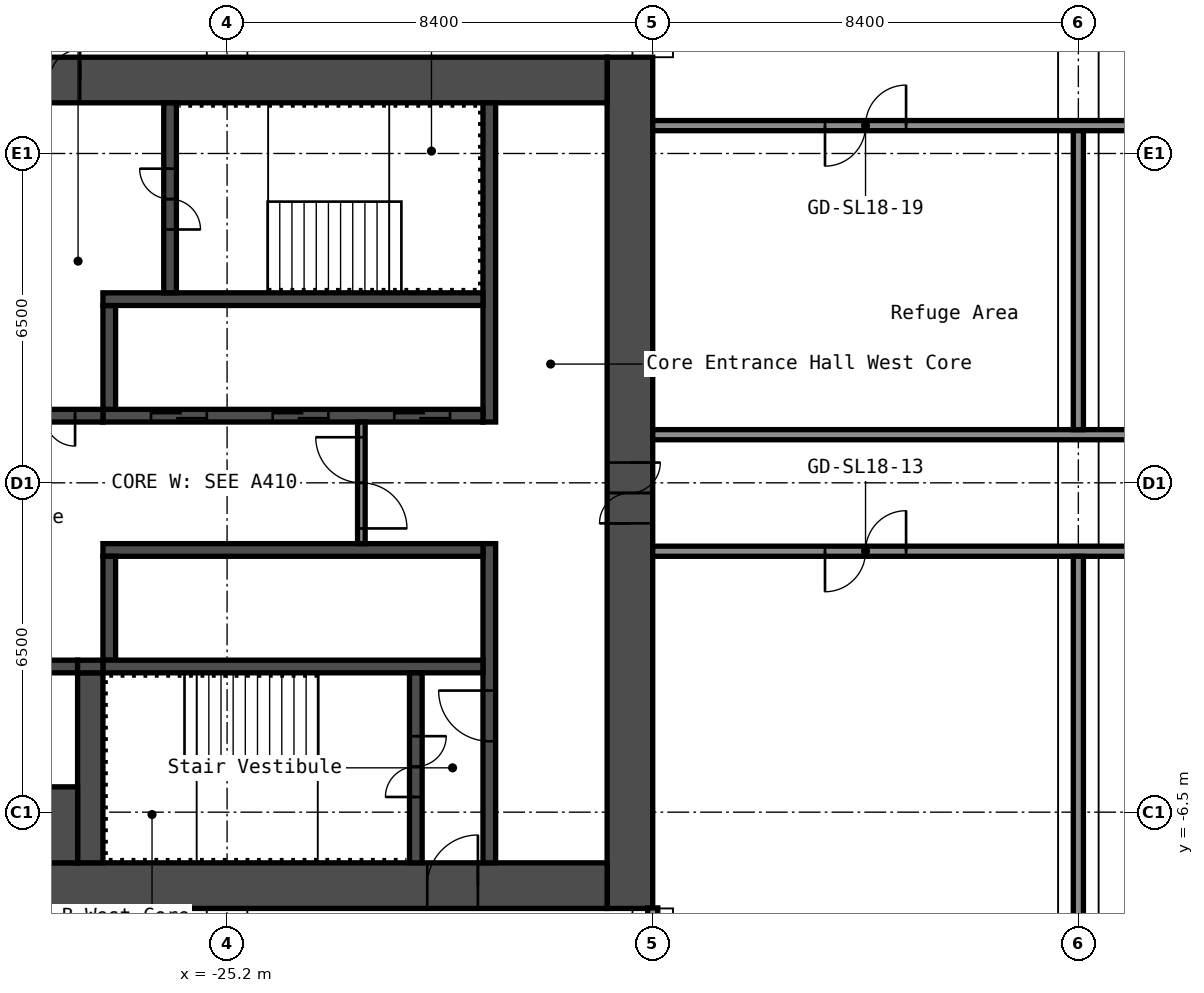
"""IFC4 building model, lengths in metres.
Left out: names, types, materials, properties, quantities, classifications, styles, units other than length and angle.
Written with IfcOpenShell. Run it as: python <this file> out.ifc"""

import sys

from ifc_helpers import new_model, si_unit, direction, frame, frame_2d, origin, place, context, subcontext, project, spatial, rectangle, extrude, element, fill, save


model = new_model("IFC4")
c1 = context("Model", 3, precision=1e-05, world=origin(), true_north=direction((0.0, 1.0)))
c2 = subcontext(c1, "Body", "Model", "MODEL_VIEW")
j1 = project(units=[si_unit("LENGTHUNIT", "METRE"), si_unit("PLANEANGLEUNIT", "RADIAN")], contexts=[c1])
p1 = place(None, origin())
s1 = spatial("IfcSite", under=j1, at=p1, CompositionType="ELEMENT")
p2 = place(p1, origin())
s2 = spatial("IfcBuilding", under=s1, at=p2, CompositionType="ELEMENT")
p3 = place(p2, frame((0.0, 0.0, 64.6)))
s3 = spatial("IfcBuildingStorey", under=s2, at=p3, CompositionType="ELEMENT", Elevation=64.6)
p4 = place(p3, frame((-17.25, -8.4, 0.0), z_axis=(0.0, 0.0, 1.0), x_axis=(0.0, 1.0, 0.0)))
e1 = element("IfcWall", 1, at=p4, inside=s3, PredefinedType="SHEAR", context=c2, shape_type="SweptSolid", body=[
    extrude(rectangle(XDim=16.8, YDim=0.9, at=frame_2d((8.4, 0.0))), origin(), (0.0, 0.0, 1.0), 4.1),
])
p5 = place(p4, frame((7.6, 0.0, 0.0)))
e2 = element("IfcOpeningElement", 2, at=p5, cuts=e1, PredefinedType="OPENING", context=c2, shape_type="SweptSolid", body=[
    extrude(rectangle(XDim=1.2, YDim=2.1, at=frame_2d((0.6, 1.05))), frame((0.0, 0.46, 0.0), z_axis=(0.0, -1.0, 0.0), x_axis=(1.0, 0.0, 0.0)), (0.0, 0.0, 1.0), 0.92),
])
p6 = place(p3, frame((-32.7, 7.95, 0.0), z_axis=(0.0, 0.0, 1.0), x_axis=(1.0, 0.0, 0.0)))
e3 = element("IfcWall", 3, at=p6, inside=s3, PredefinedType="SHEAR", context=c2, shape_type="SweptSolid", body=[
    extrude(rectangle(XDim=15.0, YDim=0.9, at=frame_2d((7.5, 0.0))), origin(), (0.0, 0.0, 1.0), 4.1),
])
p7 = place(p6, frame((3.4, 0.0, 0.0)))
e4 = element("IfcOpeningElement", 4, at=p7, cuts=e3, PredefinedType="OPENING", context=c2, shape_type="SweptSolid", body=[
    extrude(rectangle(XDim=1.2, YDim=2.1, at=frame_2d((0.6, 1.05))), frame((0.0, 0.46, 0.0), z_axis=(0.0, -1.0, 0.0), x_axis=(1.0, 0.0, 0.0)), (0.0, 0.0, 1.0), 0.92),
])
p8 = place(p6, frame((0.75, 0.0, 0.0)))
e5 = element("IfcOpeningElement", 5, at=p8, cuts=e3, PredefinedType="OPENING", context=c2, shape_type="SweptSolid", body=[
    extrude(rectangle(XDim=0.9, YDim=2.1, at=frame_2d((0.45, 1.05))), frame((0.0, 0.46, 0.0), z_axis=(0.0, -1.0, 0.0), x_axis=(1.0, 0.0, 0.0)), (0.0, 0.0, 1.0), 0.92),
])
p9 = place(p3, frame((-32.7, -7.95, 0.0), z_axis=(0.0, 0.0, 1.0), x_axis=(1.0, 0.0, 0.0)))
e6 = element("IfcWall", 6, at=p9, inside=s3, PredefinedType="SHEAR", context=c2, shape_type="SweptSolid", body=[
    extrude(rectangle(XDim=15.0, YDim=0.9, at=frame_2d((7.5, 0.0))), origin(), (0.0, 0.0, 1.0), 4.1),
])
p10 = place(p9, frame((11.45, 0.0, 0.0)))
e7 = element("IfcOpeningElement", 7, at=p10, cuts=e6, PredefinedType="OPENING", context=c2, shape_type="SweptSolid", body=[
    extrude(rectangle(XDim=1.0, YDim=2.1, at=frame_2d((0.5, 1.05))), frame((0.0, 0.46, 0.0), z_axis=(0.0, -1.0, 0.0), x_axis=(1.0, 0.0, 0.0)), (0.0, 0.0, 1.0), 0.92),
])
p11 = place(p3, frame((-20.025, 1.2, 0.0), z_axis=(0.0, 0.0, 1.0), x_axis=(0.0, 1.0, 0.0)))
e8 = element("IfcWall", 8, at=p11, inside=s3, PredefinedType="SHEAR", context=c2, shape_type="SweptSolid", body=[
    extrude(rectangle(XDim=6.3, YDim=0.25, at=frame_2d((3.15, 0.0))), origin(), (0.0, 0.0, 1.0), 4.1),
])
p12 = place(p3, frame((-20.025, -7.5, 0.0), z_axis=(0.0, 0.0, 1.0), x_axis=(0.0, 1.0, 0.0)))
e9 = element("IfcWall", 9, at=p12, inside=s3, PredefinedType="SHEAR", context=c2, shape_type="SweptSolid", body=[
    extrude(rectangle(XDim=6.3, YDim=0.25, at=frame_2d((3.15, 0.0))), origin(), (0.0, 0.0, 1.0), 4.1),
])
p13 = place(p12, frame((2.4, 0.0, 0.0)))
e10 = element("IfcOpeningElement", 10, at=p13, cuts=e9, PredefinedType="OPENING", context=c2, shape_type="SweptSolid", body=[
    extrude(rectangle(XDim=1.0, YDim=2.1, at=frame_2d((0.5, 1.05))), frame((0.0, 0.135, 0.0), z_axis=(0.0, -1.0, 0.0), x_axis=(1.0, 0.0, 0.0)), (0.0, 0.0, 1.0), 0.27),
])
p14 = place(p3, frame((-27.65, 1.325, 0.0), z_axis=(0.0, 0.0, 1.0), x_axis=(1.0, 0.0, 0.0)))
e11 = element("IfcWall", 11, at=p14, inside=s3, PredefinedType="SHEAR", context=c2, shape_type="SweptSolid", body=[
    extrude(rectangle(XDim=7.5, YDim=0.25, at=frame_2d((3.75, 0.0))), origin(), (0.0, 0.0, 1.0), 4.1),
])
p15 = place(p14, frame((5.75, 0.0, 0.0)))
e12 = element("IfcOpeningElement", 12, at=p15, cuts=e11, PredefinedType="OPENING", context=c2, shape_type="SweptSolid", body=[
    extrude(rectangle(XDim=1.1, YDim=2.1, at=frame_2d((0.55, 1.05))), frame((0.0, 0.135, 0.0), z_axis=(0.0, -1.0, 0.0), x_axis=(1.0, 0.0, 0.0)), (0.0, 0.0, 1.0), 0.27),
])
p16 = place(p14, frame((3.35, 0.0, 0.0)))
e13 = element("IfcOpeningElement", 13, at=p16, cuts=e11, PredefinedType="OPENING", context=c2, shape_type="SweptSolid", body=[
    extrude(rectangle(XDim=1.1, YDim=2.1, at=frame_2d((0.55, 1.05))), frame((0.0, 0.135, 0.0), z_axis=(0.0, -1.0, 0.0), x_axis=(1.0, 0.0, 0.0)), (0.0, 0.0, 1.0), 0.27),
])
p17 = place(p14, frame((0.95, 0.0, 0.0)))
e14 = element("IfcOpeningElement", 14, at=p17, cuts=e11, PredefinedType="OPENING", context=c2, shape_type="SweptSolid", body=[
    extrude(rectangle(XDim=1.1, YDim=2.1, at=frame_2d((0.55, 1.05))), frame((0.0, 0.135, 0.0), z_axis=(0.0, -1.0, 0.0), x_axis=(1.0, 0.0, 0.0)), (0.0, 0.0, 1.0), 0.27),
])
p18 = place(p3, frame((-27.525, 1.45, 0.0), z_axis=(0.0, 0.0, 1.0), x_axis=(0.0, 1.0, 0.0)))
e15 = element("IfcWall", 15, at=p18, inside=s3, PredefinedType="SHEAR", context=c2, shape_type="SweptSolid", body=[
    extrude(rectangle(XDim=2.05, YDim=0.25, at=frame_2d((1.025, 0.0))), origin(), (0.0, 0.0, 1.0), 4.1),
])
p19 = place(p3, frame((-27.65, 3.625, 0.0), z_axis=(0.0, 0.0, 1.0), x_axis=(1.0, 0.0, 0.0)))
e16 = element("IfcWall", 16, at=p19, inside=s3, PredefinedType="SHEAR", context=c2, shape_type="SweptSolid", body=[
    extrude(rectangle(XDim=7.5, YDim=0.25, at=frame_2d((3.75, 0.0))), origin(), (0.0, 0.0, 1.0), 4.1),
])
p20 = place(p3, frame((-26.325, 3.75, 0.0), z_axis=(0.0, 0.0, 1.0), x_axis=(0.0, 1.0, 0.0)))
e17 = element("IfcWall", 17, at=p20, inside=s3, PredefinedType="SHEAR", context=c2, shape_type="SweptSolid", body=[
    extrude(rectangle(XDim=3.75, YDim=0.25, at=frame_2d((1.875, 0.0))), origin(), (0.0, 0.0, 1.0), 4.1),
])
p21 = place(p20, frame((1.25, 0.0, 0.0)))
e18 = element("IfcOpeningElement", 18, at=p21, cuts=e17, PredefinedType="OPENING", context=c2, shape_type="SweptSolid", body=[
    extrude(rectangle(XDim=1.2, YDim=2.1, at=frame_2d((0.6, 1.05))), frame((0.0, 0.135, 0.0), z_axis=(0.0, -1.0, 0.0), x_axis=(1.0, 0.0, 0.0)), (0.0, 0.0, 1.0), 0.27),
])
p22 = place(p3, frame((-32.7, 1.325, 0.0), z_axis=(0.0, 0.0, 1.0), x_axis=(1.0, 0.0, 0.0)))
e19 = element("IfcWall", 19, at=p22, inside=s3, PredefinedType="SHEAR", context=c2, shape_type="SweptSolid", body=[
    extrude(rectangle(XDim=5.05, YDim=0.25, at=frame_2d((2.525, 0.0))), origin(), (0.0, 0.0, 1.0), 4.1),
])
p23 = place(p22, frame((3.3, 0.0, 0.0)))
e20 = element("IfcOpeningElement", 20, at=p23, cuts=e19, PredefinedType="OPENING", context=c2, shape_type="SweptSolid", body=[
    extrude(rectangle(XDim=1.2, YDim=2.1, at=frame_2d((0.6, 1.05))), frame((0.0, 0.135, 0.0), z_axis=(0.0, -1.0, 0.0), x_axis=(1.0, 0.0, 0.0)), (0.0, 0.0, 1.0), 0.27),
])
p24 = place(p3, frame((-27.65, -1.325, 0.0), z_axis=(0.0, 0.0, 1.0), x_axis=(1.0, 0.0, 0.0)))
e21 = element("IfcWall", 21, at=p24, inside=s3, PredefinedType="SHEAR", context=c2, shape_type="SweptSolid", body=[
    extrude(rectangle(XDim=7.5, YDim=0.25, at=frame_2d((3.75, 0.0))), origin(), (0.0, 0.0, 1.0), 4.1),
])
p25 = place(p3, frame((-27.525, -3.5, 0.0), z_axis=(0.0, 0.0, 1.0), x_axis=(0.0, 1.0, 0.0)))
e22 = element("IfcWall", 22, at=p25, inside=s3, PredefinedType="SHEAR", context=c2, shape_type="SweptSolid", body=[
    extrude(rectangle(XDim=2.05, YDim=0.25, at=frame_2d((1.025, 0.0))), origin(), (0.0, 0.0, 1.0), 4.1),
])
p26 = place(p3, frame((-27.65, -3.625, 0.0), z_axis=(0.0, 0.0, 1.0), x_axis=(1.0, 0.0, 0.0)))
e23 = element("IfcWall", 23, at=p26, inside=s3, PredefinedType="SHEAR", context=c2, shape_type="SweptSolid", body=[
    extrude(rectangle(XDim=7.5, YDim=0.25, at=frame_2d((3.75, 0.0))), origin(), (0.0, 0.0, 1.0), 4.1),
])
p27 = place(p3, frame((-21.475, -7.5, 0.0), z_axis=(0.0, 0.0, 1.0), x_axis=(0.0, 1.0, 0.0)))
e24 = element("IfcWall", 24, at=p27, inside=s3, PredefinedType="SHEAR", context=c2, shape_type="SweptSolid", body=[
    extrude(rectangle(XDim=3.75, YDim=0.25, at=frame_2d((1.875, 0.0))), origin(), (0.0, 0.0, 1.0), 4.1),
])
p28 = place(p27, frame((1.3, 0.0, 0.0)))
e25 = element("IfcOpeningElement", 25, at=p28, cuts=e24, PredefinedType="OPENING", context=c2, shape_type="SweptSolid", body=[
    extrude(rectangle(XDim=1.2, YDim=2.1, at=frame_2d((0.6, 1.05))), frame((0.0, 0.135, 0.0), z_axis=(0.0, -1.0, 0.0), x_axis=(1.0, 0.0, 0.0)), (0.0, 0.0, 1.0), 0.27),
])
p29 = place(p3, frame((-27.9, -7.5, 0.0), z_axis=(0.0, 0.0, 1.0), x_axis=(0.0, 1.0, 0.0)))
e26 = element("IfcWall", 26, at=p29, inside=s3, PredefinedType="SHEAR", context=c2, shape_type="SweptSolid", body=[
    extrude(rectangle(XDim=3.75, YDim=0.5, at=frame_2d((1.875, 0.0))), origin(), (0.0, 0.0, 1.0), 4.1),
])
p30 = place(p3, frame((-32.7, -3.625, 0.0), z_axis=(0.0, 0.0, 1.0), x_axis=(1.0, 0.0, 0.0)))
e27 = element("IfcWall", 27, at=p30, inside=s3, PredefinedType="SHEAR", context=c2, shape_type="SweptSolid", body=[
    extrude(rectangle(XDim=4.55, YDim=0.25, at=frame_2d((2.275, 0.0))), origin(), (0.0, 0.0, 1.0), 4.1),
])
p31 = place(p30, frame((2.85, 0.0, 0.0)))
e28 = element("IfcOpeningElement", 28, at=p31, cuts=e27, PredefinedType="OPENING", context=c2, shape_type="SweptSolid", body=[
    extrude(rectangle(XDim=1.1, YDim=2.1, at=frame_2d((0.55, 1.05))), frame((0.0, 0.135, 0.0), z_axis=(0.0, -1.0, 0.0), x_axis=(1.0, 0.0, 0.0)), (0.0, 0.0, 1.0), 0.27),
])
p32 = place(p30, frame((0.6, 0.0, 0.0)))
e29 = element("IfcOpeningElement", 29, at=p32, cuts=e27, PredefinedType="OPENING", context=c2, shape_type="SweptSolid", body=[
    extrude(rectangle(XDim=1.1, YDim=2.1, at=frame_2d((0.55, 1.05))), frame((0.0, 0.135, 0.0), z_axis=(0.0, -1.0, 0.0), x_axis=(1.0, 0.0, 0.0)), (0.0, 0.0, 1.0), 0.27),
])
p33 = place(p3, frame((-32.7, -6.75, 0.0), z_axis=(0.0, 0.0, 1.0), x_axis=(1.0, 0.0, 0.0)))
e30 = element("IfcWall", 30, at=p33, inside=s3, PredefinedType="SHEAR", context=c2, shape_type="SweptSolid", body=[
    extrude(rectangle(XDim=4.55, YDim=1.5, at=frame_2d((2.275, 0.0))), origin(), (0.0, 0.0, 1.0), 4.1),
])
p34 = place(p3, frame((-28.15, -3.625, 0.0), z_axis=(0.0, 0.0, 1.0), x_axis=(1.0, 0.0, 0.0)))
e31 = element("IfcWall", 31, at=p34, inside=s3, PredefinedType="SHEAR", context=c2, shape_type="SweptSolid", body=[
    extrude(rectangle(XDim=0.5, YDim=0.25, at=frame_2d((0.25, 0.0))), origin(), (0.0, 0.0, 1.0), 4.1),
])
p35 = place(p3, frame((-22.55, -1.2, 0.0), z_axis=(0.0, 0.0, 1.0), x_axis=(0.0, 1.0, 0.0)))
e32 = element("IfcWall", 32, at=p35, inside=s3, PredefinedType="PARTITIONING", context=c2, shape_type="SweptSolid", body=[
    extrude(rectangle(XDim=2.4, YDim=0.15, at=frame_2d((1.2, 0.0))), origin(), (0.0, 0.0, 1.0), 4.1),
])
p36 = place(p35, frame((0.3, 0.0, 0.0)))
e33 = element("IfcOpeningElement", 33, at=p36, cuts=e32, PredefinedType="OPENING", context=c2, shape_type="SweptSolid", body=[
    extrude(rectangle(XDim=1.8, YDim=2.1, at=frame_2d((0.9, 1.05))), frame((0.0, 0.085, 0.0), z_axis=(0.0, -1.0, 0.0), x_axis=(1.0, 0.0, 0.0)), (0.0, 0.0, 1.0), 0.17),
])
p37 = place(p3, frame((-16.8, -1.35, 0.0), z_axis=(0.0, 0.0, 1.0), x_axis=(1.0, 0.0, 0.0)))
e34 = element("IfcWall", 34, at=p37, inside=s3, PredefinedType="PARTITIONING", context=c2, shape_type="SweptSolid", body=[
    extrude(rectangle(XDim=33.6, YDim=0.2, at=frame_2d((16.8, 0.0))), origin(), (0.0, 0.0, 1.0), 4.1),
])
p38 = place(p37, frame((3.4, 0.0, 0.0)))
e35 = element("IfcOpeningElement", 35, at=p38, cuts=e34, PredefinedType="OPENING", context=c2, shape_type="SweptSolid", body=[
    extrude(rectangle(XDim=1.6, YDim=2.1, at=frame_2d((0.8, 1.05))), frame((0.0, 0.11, 0.0), z_axis=(0.0, -1.0, 0.0), x_axis=(1.0, 0.0, 0.0)), (0.0, 0.0, 1.0), 0.22),
])
p39 = place(p37, frame((11.8, 0.0, 0.0)))
e36 = element("IfcOpeningElement", 36, at=p39, cuts=e34, PredefinedType="OPENING", context=c2, shape_type="SweptSolid", body=[
    extrude(rectangle(XDim=1.6, YDim=2.1, at=frame_2d((0.8, 1.05))), frame((0.0, 0.11, 0.0), z_axis=(0.0, -1.0, 0.0), x_axis=(1.0, 0.0, 0.0)), (0.0, 0.0, 1.0), 0.22),
])
p40 = place(p37, frame((20.55, 0.0, 0.0)))
e37 = element("IfcOpeningElement", 37, at=p40, cuts=e34, PredefinedType="OPENING", context=c2, shape_type="SweptSolid", body=[
    extrude(rectangle(XDim=0.9, YDim=2.1, at=frame_2d((0.45, 1.05))), frame((0.0, 0.11, 0.0), z_axis=(0.0, -1.0, 0.0), x_axis=(1.0, 0.0, 0.0)), (0.0, 0.0, 1.0), 0.22),
])
p41 = place(p37, frame((28.95, 0.0, 0.0)))
e38 = element("IfcOpeningElement", 38, at=p41, cuts=e34, PredefinedType="OPENING", context=c2, shape_type="SweptSolid", body=[
    extrude(rectangle(XDim=0.9, YDim=2.1, at=frame_2d((0.45, 1.05))), frame((0.0, 0.11, 0.0), z_axis=(0.0, -1.0, 0.0), x_axis=(1.0, 0.0, 0.0)), (0.0, 0.0, 1.0), 0.22),
])
p42 = place(p3, frame((-16.8, 0.95, 0.0), z_axis=(0.0, 0.0, 1.0), x_axis=(1.0, 0.0, 0.0)))
e39 = element("IfcWall", 39, at=p42, inside=s3, PredefinedType="PARTITIONING", context=c2, shape_type="SweptSolid", body=[
    extrude(rectangle(XDim=33.6, YDim=0.2, at=frame_2d((16.8, 0.0))), origin(), (0.0, 0.0, 1.0), 4.1),
])
p43 = place(p42, frame((12.15, 0.0, 0.0)))
e40 = element("IfcOpeningElement", 40, at=p43, cuts=e39, PredefinedType="OPENING", context=c2, shape_type="SweptSolid", body=[
    extrude(rectangle(XDim=0.9, YDim=2.1, at=frame_2d((0.45, 1.05))), frame((0.0, 0.11, 0.0), z_axis=(0.0, -1.0, 0.0), x_axis=(1.0, 0.0, 0.0)), (0.0, 0.0, 1.0), 0.22),
])
p44 = place(p42, frame((28.6, 0.0, 0.0)))
e41 = element("IfcOpeningElement", 41, at=p44, cuts=e39, PredefinedType="OPENING", context=c2, shape_type="SweptSolid", body=[
    extrude(rectangle(XDim=1.6, YDim=2.1, at=frame_2d((0.8, 1.05))), frame((0.0, 0.11, 0.0), z_axis=(0.0, -1.0, 0.0), x_axis=(1.0, 0.0, 0.0)), (0.0, 0.0, 1.0), 0.22),
])
p45 = place(p3, frame((-16.8, 7.05, 0.0), z_axis=(0.0, 0.0, 1.0), x_axis=(1.0, 0.0, 0.0)))
e42 = element("IfcWall", 42, at=p45, inside=s3, PredefinedType="PARTITIONING", context=c2, shape_type="SweptSolid", body=[
    extrude(rectangle(XDim=33.6, YDim=0.2, at=frame_2d((16.8, 0.0))), origin(), (0.0, 0.0, 1.0), 4.1),
])
p46 = place(p45, frame((3.4, 0.0, 0.0)))
e43 = element("IfcOpeningElement", 43, at=p46, cuts=e42, PredefinedType="OPENING", context=c2, shape_type="SweptSolid", body=[
    extrude(rectangle(XDim=1.6, YDim=2.1, at=frame_2d((0.8, 1.05))), frame((0.0, 0.11, 0.0), z_axis=(0.0, -1.0, 0.0), x_axis=(1.0, 0.0, 0.0)), (0.0, 0.0, 1.0), 0.22),
])
p47 = place(p45, frame((20.55, 0.0, 0.0)))
e44 = element("IfcOpeningElement", 44, at=p47, cuts=e42, PredefinedType="OPENING", context=c2, shape_type="SweptSolid", body=[
    extrude(rectangle(XDim=0.9, YDim=2.1, at=frame_2d((0.45, 1.05))), frame((0.0, 0.11, 0.0), z_axis=(0.0, -1.0, 0.0), x_axis=(1.0, 0.0, 0.0)), (0.0, 0.0, 1.0), 0.22),
])
p48 = place(p3, frame((-16.8, -20.3, 0.0), z_axis=(0.0, 0.0, 1.0), x_axis=(0.0, 1.0, 0.0)))
e45 = element("IfcWall", 45, at=p48, inside=s3, PredefinedType="PARTITIONING", context=c2, shape_type="SweptSolid", body=[
    extrude(rectangle(XDim=11.91, YDim=0.2, at=frame_2d((5.955, 0.0))), origin(), (0.0, 0.0, 1.0), 4.1),
])
p49 = place(p3, frame((-8.4, -20.3, 0.0), z_axis=(0.0, 0.0, 1.0), x_axis=(0.0, 1.0, 0.0)))
e46 = element("IfcWall", 46, at=p49, inside=s3, PredefinedType="PARTITIONING", context=c2, shape_type="SweptSolid", body=[
    extrude(rectangle(XDim=18.85, YDim=0.2, at=frame_2d((9.425, 0.0))), origin(), (0.0, 0.0, 1.0), 4.1),
])
p50 = place(p3, frame((-8.4, 1.05, 0.0), z_axis=(0.0, 0.0, 1.0), x_axis=(0.0, 1.0, 0.0)))
e47 = element("IfcWall", 47, at=p50, inside=s3, PredefinedType="PARTITIONING", context=c2, shape_type="SweptSolid", body=[
    extrude(rectangle(XDim=5.9, YDim=0.2, at=frame_2d((2.95, 0.0))), origin(), (0.0, 0.0, 1.0), 4.1),
])
p51 = place(p5, origin())
e48 = element("IfcDoor", 48, at=p51, inside=s3, OperationType="DOUBLE_DOOR_SINGLE_SWING", PredefinedType="DOOR", context=c2, shape_type="SweptSolid", body=[
    extrude(rectangle(XDim=1.2, YDim=2.1, at=frame_2d((0.6, 1.05))), frame((0.0, 0.025, 0.0), z_axis=(0.0, -1.0, 0.0), x_axis=(1.0, 0.0, 0.0)), (0.0, 0.0, 1.0), 0.05),
])
fill(e2, e48)
p52 = place(p7, origin())
e49 = element("IfcDoor", 49, at=p52, inside=s3, OperationType="DOUBLE_DOOR_SINGLE_SWING", PredefinedType="DOOR", context=c2, shape_type="SweptSolid", body=[
    extrude(rectangle(XDim=1.2, YDim=2.1, at=frame_2d((0.6, 1.05))), frame((0.0, 0.025, 0.0), z_axis=(0.0, -1.0, 0.0), x_axis=(1.0, 0.0, 0.0)), (0.0, 0.0, 1.0), 0.05),
])
fill(e4, e49)
p53 = place(p10, origin())
e50 = element("IfcDoor", 50, at=p53, inside=s3, OperationType="SINGLE_SWING_LEFT", PredefinedType="DOOR", context=c2, shape_type="SweptSolid", body=[
    extrude(rectangle(XDim=1.0, YDim=2.1, at=frame_2d((0.5, 1.05))), frame((0.0, 0.025, 0.0), z_axis=(0.0, -1.0, 0.0), x_axis=(1.0, 0.0, 0.0)), (0.0, 0.0, 1.0), 0.05),
])
fill(e7, e50)
p54 = place(p21, origin())
e51 = element("IfcDoor", 51, at=p54, inside=s3, OperationType="DOUBLE_DOOR_SINGLE_SWING", PredefinedType="DOOR", context=c2, shape_type="SweptSolid", body=[
    extrude(rectangle(XDim=1.2, YDim=2.1, at=frame_2d((0.6, 1.05))), frame((0.0, 0.025, 0.0), z_axis=(0.0, -1.0, 0.0), x_axis=(1.0, 0.0, 0.0)), (0.0, 0.0, 1.0), 0.05),
])
fill(e18, e51)
p55 = place(p28, origin())
e52 = element("IfcDoor", 52, at=p55, inside=s3, OperationType="DOUBLE_DOOR_SINGLE_SWING", PredefinedType="DOOR", context=c2, shape_type="SweptSolid", body=[
    extrude(rectangle(XDim=1.2, YDim=2.1, at=frame_2d((0.6, 1.05))), frame((0.0, 0.025, 0.0), z_axis=(0.0, -1.0, 0.0), x_axis=(1.0, 0.0, 0.0)), (0.0, 0.0, 1.0), 0.05),
])
fill(e25, e52)
p56 = place(p13, origin())
e53 = element("IfcDoor", 53, at=p56, inside=s3, OperationType="SINGLE_SWING_LEFT", PredefinedType="DOOR", context=c2, shape_type="SweptSolid", body=[
    extrude(rectangle(XDim=1.0, YDim=2.1, at=frame_2d((0.5, 1.05))), frame((0.0, 0.025, 0.0), z_axis=(0.0, -1.0, 0.0), x_axis=(1.0, 0.0, 0.0)), (0.0, 0.0, 1.0), 0.05),
])
fill(e10, e53)
p57 = place(p23, origin())
e54 = element("IfcDoor", 54, at=p57, inside=s3, OperationType="DOUBLE_DOOR_SINGLE_SWING", PredefinedType="DOOR", context=c2, shape_type="SweptSolid", body=[
    extrude(rectangle(XDim=1.2, YDim=2.1, at=frame_2d((0.6, 1.05))), frame((0.0, 0.025, 0.0), z_axis=(0.0, -1.0, 0.0), x_axis=(1.0, 0.0, 0.0)), (0.0, 0.0, 1.0), 0.05),
])
fill(e20, e54)
p58 = place(p36, origin())
e55 = element("IfcDoor", 55, at=p58, inside=s3, OperationType="DOUBLE_DOOR_SINGLE_SWING", PredefinedType="DOOR", context=c2, shape_type="SweptSolid", body=[
    extrude(rectangle(XDim=1.8, YDim=2.1, at=frame_2d((0.9, 1.05))), frame((0.0, 0.025, 0.0), z_axis=(0.0, -1.0, 0.0), x_axis=(1.0, 0.0, 0.0)), (0.0, 0.0, 1.0), 0.05),
])
fill(e33, e55)
p59 = place(p15, origin())
e56 = element("IfcDoor", 56, at=p59, inside=s3, OperationType="DOUBLE_DOOR_SLIDING", PredefinedType="DOOR", context=c2, shape_type="SweptSolid", body=[
    extrude(rectangle(XDim=1.1, YDim=2.1, at=frame_2d((0.55, 1.05))), frame((0.0, 0.025, 0.0), z_axis=(0.0, -1.0, 0.0), x_axis=(1.0, 0.0, 0.0)), (0.0, 0.0, 1.0), 0.05),
])
fill(e12, e56)
p60 = place(p16, origin())
e57 = element("IfcDoor", 57, at=p60, inside=s3, OperationType="DOUBLE_DOOR_SLIDING", PredefinedType="DOOR", context=c2, shape_type="SweptSolid", body=[
    extrude(rectangle(XDim=1.1, YDim=2.1, at=frame_2d((0.55, 1.05))), frame((0.0, 0.025, 0.0), z_axis=(0.0, -1.0, 0.0), x_axis=(1.0, 0.0, 0.0)), (0.0, 0.0, 1.0), 0.05),
])
fill(e13, e57)
p61 = place(p17, origin())
e58 = element("IfcDoor", 58, at=p61, inside=s3, OperationType="DOUBLE_DOOR_SLIDING", PredefinedType="DOOR", context=c2, shape_type="SweptSolid", body=[
    extrude(rectangle(XDim=1.1, YDim=2.1, at=frame_2d((0.55, 1.05))), frame((0.0, 0.025, 0.0), z_axis=(0.0, -1.0, 0.0), x_axis=(1.0, 0.0, 0.0)), (0.0, 0.0, 1.0), 0.05),
])
fill(e14, e58)
p62 = place(p38, origin())
e59 = element("IfcDoor", 59, at=p62, inside=s3, OperationType="DOUBLE_DOOR_SINGLE_SWING", PredefinedType="DOOR", context=c2, shape_type="SweptSolid", body=[
    extrude(rectangle(XDim=1.6, YDim=2.1, at=frame_2d((0.8, 1.05))), frame((0.0, 0.025, 0.0), z_axis=(0.0, -1.0, 0.0), x_axis=(1.0, 0.0, 0.0)), (0.0, 0.0, 1.0), 0.05),
])
fill(e35, e59)
p63 = place(p46, origin())
e60 = element("IfcDoor", 60, at=p63, inside=s3, OperationType="DOUBLE_DOOR_SINGLE_SWING", PredefinedType="DOOR", context=c2, shape_type="SweptSolid", body=[
    extrude(rectangle(XDim=1.6, YDim=2.1, at=frame_2d((0.8, 1.05))), frame((0.0, 0.025, 0.0), z_axis=(0.0, -1.0, 0.0), x_axis=(1.0, 0.0, 0.0)), (0.0, 0.0, 1.0), 0.05),
])
fill(e43, e60)
save(model, sys.argv[1])
